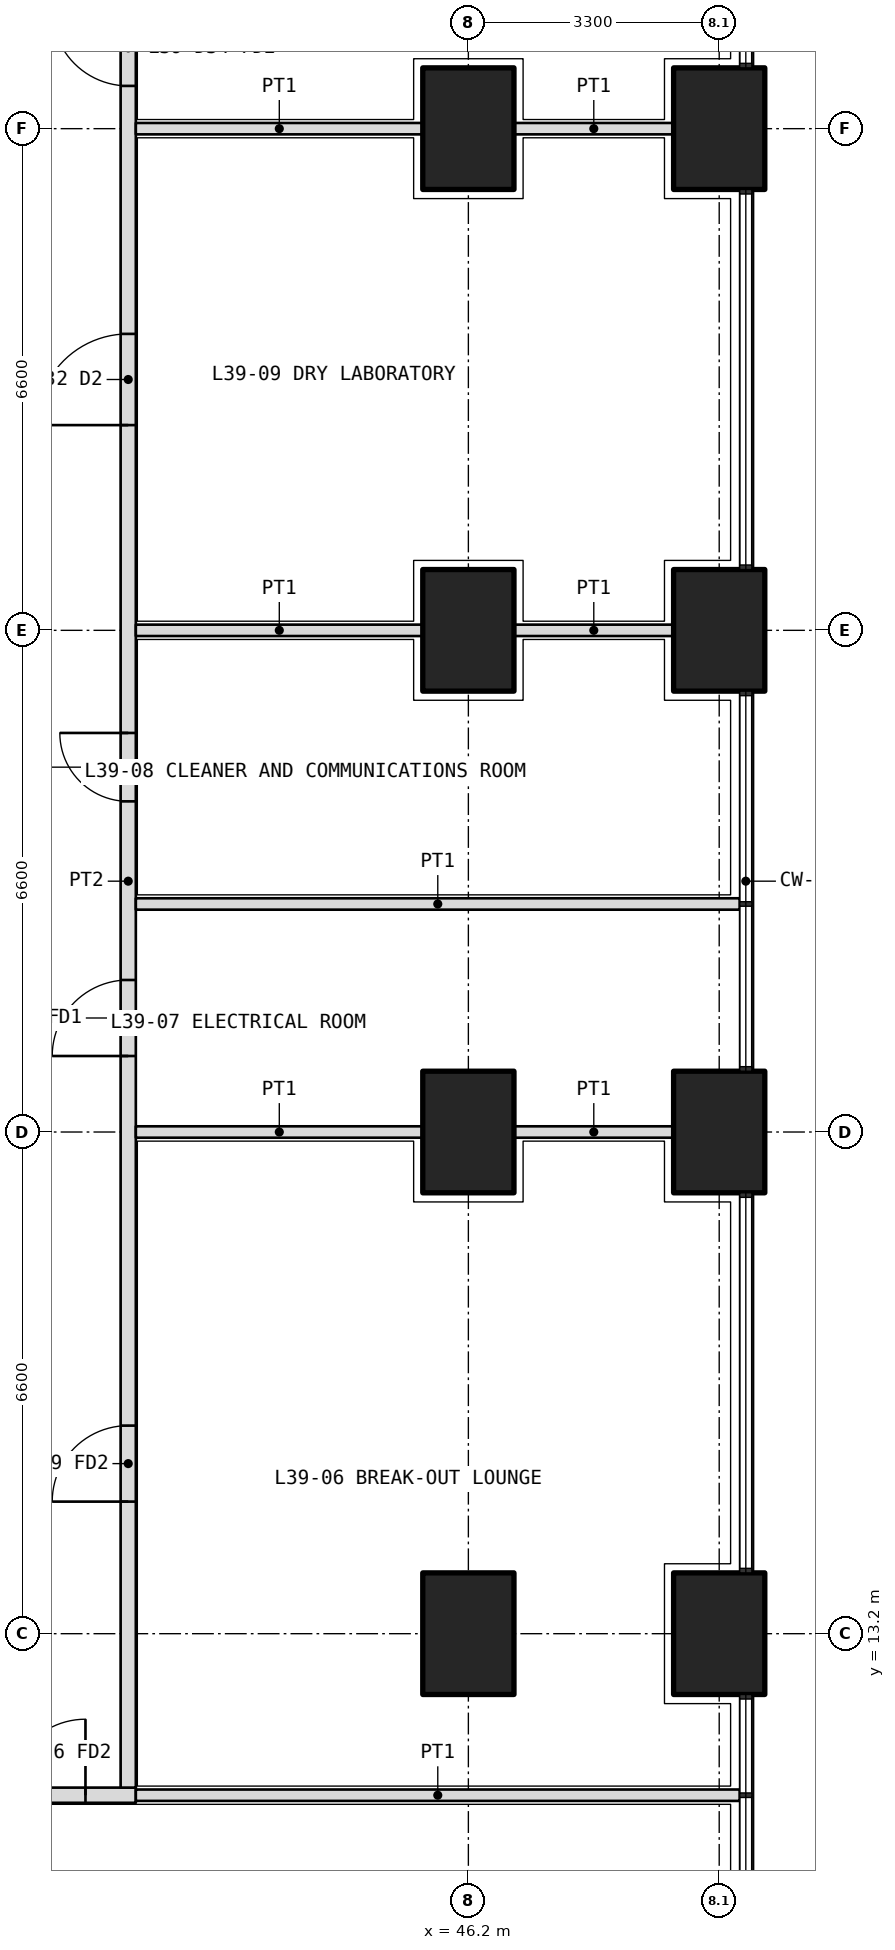
"""IFC4 building model, lengths in metres.
Left out: names, types, materials, properties, quantities, classifications, styles, units other than length and angle.
Written with IfcOpenShell. Run it as: python <this file> out.ifc"""

import sys

from ifc_helpers import new_model, si_unit, direction, frame, frame_2d, origin, origin_2d, place, context, subcontext, project, spatial, rectangle, extrude, element, fill, save


model = new_model("IFC4")
c1 = context("Model", 3, precision=1e-05, world=origin(), true_north=direction((0.0, 1.0)))
c2 = subcontext(c1, "Body", "Model", "MODEL_VIEW")
j1 = project(units=[si_unit("LENGTHUNIT", "METRE"), si_unit("PLANEANGLEUNIT", "RADIAN")], contexts=[c1])
p1 = place(None, origin())
s1 = spatial("IfcSite", under=j1, at=p1, CompositionType="ELEMENT")
p2 = place(p1, origin())
s2 = spatial("IfcBuilding", under=s1, at=p2, CompositionType="ELEMENT")
p3 = place(p2, frame((0.0, 0.0, 172.5)))
s3 = spatial("IfcBuildingStorey", under=s2, at=p3, CompositionType="ELEMENT", Elevation=172.5)
for number, where, z_axis, x_axis in (
    (1, (49.5, 13.2, 0.0), (0.0, 0.0, 1.0), (0.0, 1.0, 0.0)),
    (2, (49.5, 19.8, 0.0), (0.0, 0.0, 1.0), (0.0, 1.0, 0.0)),
    (3, (49.5, 26.4, 0.0), (0.0, 0.0, 1.0), (0.0, 1.0, 0.0)),
    (4, (49.5, 33.0, 0.0), (0.0, 0.0, 1.0), (0.0, 1.0, 0.0)),
    (5, (46.2, 13.2, 0.0), (0.0, 0.0, 1.0), (0.0, 1.0, 0.0)),
    (6, (46.2, 19.8, 0.0), (0.0, 0.0, 1.0), (0.0, 1.0, 0.0)),
    (7, (46.2, 26.4, 0.0), (0.0, 0.0, 1.0), (0.0, 1.0, 0.0)),
    (8, (46.2, 33.0, 0.0), (0.0, 0.0, 1.0), (0.0, 1.0, 0.0)),
):
    element("IfcColumn", number, at=place(p3, frame(where, z_axis=z_axis, x_axis=x_axis)), inside=s3, PredefinedType="COLUMN", context=c2, shape_type="SweptSolid", body=[
        extrude(rectangle(XDim=1.6, YDim=1.2, at=origin_2d()), origin(), (0.0, 0.0, 1.0), 4.2),
    ])
p4 = place(p3, frame((10.975, 11.075, 0.0), z_axis=(0.0, 0.0, 1.0), x_axis=(1.0, 0.0, 0.0)))
e9 = element("IfcWall", 9, at=p4, inside=s3, PredefinedType="PARTITIONING", context=c2, shape_type="SweptSolid", body=[
    extrude(rectangle(XDim=30.85, YDim=0.2, at=frame_2d((15.425, 0.0))), origin(), (0.0, 0.0, 1.0), 2.85),
])
p5 = place(p4, frame((7.262, 0.0, 0.0)))
e10 = element("IfcOpeningElement", 10, at=p5, cuts=e9, PredefinedType="OPENING", context=c2, shape_type="SweptSolid", body=[
    extrude(rectangle(XDim=1.0, YDim=2.1, at=frame_2d((0.5, 1.05))), frame((0.0, 0.11, 0.0), z_axis=(0.0, -1.0, 0.0), x_axis=(1.0, 0.0, 0.0)), (0.0, 0.0, 1.0), 0.22),
])
p6 = place(p4, frame((16.475, 0.0, 0.0)))
e11 = element("IfcOpeningElement", 11, at=p6, cuts=e9, PredefinedType="OPENING", context=c2, shape_type="SweptSolid", body=[
    extrude(rectangle(XDim=1.2, YDim=2.1, at=frame_2d((0.6, 1.05))), frame((0.0, 0.11, 0.0), z_axis=(0.0, -1.0, 0.0), x_axis=(1.0, 0.0, 0.0)), (0.0, 0.0, 1.0), 0.22),
])
p7 = place(p4, frame((21.525, 0.0, 0.0)))
e12 = element("IfcOpeningElement", 12, at=p7, cuts=e9, PredefinedType="OPENING", context=c2, shape_type="SweptSolid", body=[
    extrude(rectangle(XDim=1.0, YDim=2.1, at=frame_2d((0.5, 1.05))), frame((0.0, 0.11, 0.0), z_axis=(0.0, -1.0, 0.0), x_axis=(1.0, 0.0, 0.0)), (0.0, 0.0, 1.0), 0.22),
])
p8 = place(p4, frame((26.375, 0.0, 0.0)))
e13 = element("IfcOpeningElement", 13, at=p8, cuts=e9, PredefinedType="OPENING", context=c2, shape_type="SweptSolid", body=[
    extrude(rectangle(XDim=1.2, YDim=2.1, at=frame_2d((0.6, 1.05))), frame((0.0, 0.11, 0.0), z_axis=(0.0, -1.0, 0.0), x_axis=(1.0, 0.0, 0.0)), (0.0, 0.0, 1.0), 0.22),
])
p9 = place(p4, frame((29.188, 0.0, 0.0)))
e14 = element("IfcOpeningElement", 14, at=p9, cuts=e9, PredefinedType="OPENING", context=c2, shape_type="SweptSolid", body=[
    extrude(rectangle(XDim=1.0, YDim=2.1, at=frame_2d((0.5, 1.05))), frame((0.0, 0.11, 0.0), z_axis=(0.0, -1.0, 0.0), x_axis=(1.0, 0.0, 0.0)), (0.0, 0.0, 1.0), 0.22),
])
p10 = place(p3, frame((41.725, 11.175, 0.0), z_axis=(0.0, 0.0, 1.0), x_axis=(0.0, 1.0, 0.0)))
e15 = element("IfcWall", 15, at=p10, inside=s3, PredefinedType="PARTITIONING", context=c2, shape_type="SweptSolid", body=[
    extrude(rectangle(XDim=23.85, YDim=0.2, at=frame_2d((11.925, 0.0))), origin(), (0.0, 0.0, 1.0), 2.85),
])
p11 = place(p10, frame((3.762, 0.0, 0.0)))
e16 = element("IfcOpeningElement", 16, at=p11, cuts=e15, PredefinedType="OPENING", context=c2, shape_type="SweptSolid", body=[
    extrude(rectangle(XDim=1.0, YDim=2.1, at=frame_2d((0.5, 1.05))), frame((0.0, 0.11, 0.0), z_axis=(0.0, -1.0, 0.0), x_axis=(1.0, 0.0, 0.0)), (0.0, 0.0, 1.0), 0.22),
])
p12 = place(p10, frame((9.625, 0.0, 0.0)))
e17 = element("IfcOpeningElement", 17, at=p12, cuts=e15, PredefinedType="OPENING", context=c2, shape_type="SweptSolid", body=[
    extrude(rectangle(XDim=1.0, YDim=2.1, at=frame_2d((0.5, 1.05))), frame((0.0, 0.11, 0.0), z_axis=(0.0, -1.0, 0.0), x_axis=(1.0, 0.0, 0.0)), (0.0, 0.0, 1.0), 0.22),
])
p13 = place(p10, frame((12.975, 0.0, 0.0)))
e18 = element("IfcOpeningElement", 18, at=p13, cuts=e15, PredefinedType="OPENING", context=c2, shape_type="SweptSolid", body=[
    extrude(rectangle(XDim=0.9, YDim=2.1, at=frame_2d((0.45, 1.05))), frame((0.0, 0.11, 0.0), z_axis=(0.0, -1.0, 0.0), x_axis=(1.0, 0.0, 0.0)), (0.0, 0.0, 1.0), 0.22),
])
p14 = place(p10, frame((17.925, 0.0, 0.0)))
e19 = element("IfcOpeningElement", 19, at=p14, cuts=e15, PredefinedType="OPENING", context=c2, shape_type="SweptSolid", body=[
    extrude(rectangle(XDim=1.2, YDim=2.1, at=frame_2d((0.6, 1.05))), frame((0.0, 0.11, 0.0), z_axis=(0.0, -1.0, 0.0), x_axis=(1.0, 0.0, 0.0)), (0.0, 0.0, 1.0), 0.22),
])
p15 = place(p10, frame((22.387, 0.0, 0.0)))
e20 = element("IfcOpeningElement", 20, at=p15, cuts=e15, PredefinedType="OPENING", context=c2, shape_type="SweptSolid", body=[
    extrude(rectangle(XDim=1.0, YDim=2.1, at=frame_2d((0.5, 1.05))), frame((0.0, 0.11, 0.0), z_axis=(0.0, -1.0, 0.0), x_axis=(1.0, 0.0, 0.0)), (0.0, 0.0, 1.0), 0.22),
])
for number, where, z_axis, x_axis in (
    (21, (49.77, 11.075, 0.0), (0.0, 0.0, 1.0), (-1.0, 0.0, 0.0)),
    (22, (49.77, 22.8, 0.0), (0.0, 0.0, 1.0), (-1.0, 0.0, 0.0)),
):
    element("IfcWall", number, at=place(p3, frame(where, z_axis=z_axis, x_axis=x_axis)), inside=s3, PredefinedType="PARTITIONING", context=c2, shape_type="SweptSolid", body=[
        extrude(rectangle(XDim=7.945, YDim=0.15, at=frame_2d((3.973, 0.0))), origin(), (0.0, 0.0, 1.0), 2.7),
    ])
p16 = place(p3, frame((48.9, 26.4, 0.0), z_axis=(0.0, 0.0, 1.0), x_axis=(-1.0, 0.0, 0.0)))
e23 = element("IfcWall", 23, at=p16, inside=s3, PredefinedType="PARTITIONING", context=c2, shape_type="SweptSolid", body=[
    extrude(rectangle(XDim=2.1, YDim=0.15, at=frame_2d((1.05, 0.0))), origin(), (0.0, 0.0, 1.0), 2.85),
])
p17 = place(p3, frame((45.6, 26.4, 0.0), z_axis=(0.0, 0.0, 1.0), x_axis=(-1.0, 0.0, 0.0)))
e24 = element("IfcWall", 24, at=p17, inside=s3, PredefinedType="PARTITIONING", context=c2, shape_type="SweptSolid", body=[
    extrude(rectangle(XDim=3.775, YDim=0.15, at=frame_2d((1.888, 0.0))), origin(), (0.0, 0.0, 1.0), 2.85),
])
p18 = place(p3, frame((48.9, 19.8, 0.0), z_axis=(0.0, 0.0, 1.0), x_axis=(-1.0, 0.0, 0.0)))
e25 = element("IfcWall", 25, at=p18, inside=s3, PredefinedType="PARTITIONING", context=c2, shape_type="SweptSolid", body=[
    extrude(rectangle(XDim=2.1, YDim=0.15, at=frame_2d((1.05, 0.0))), origin(), (0.0, 0.0, 1.0), 2.85),
])
p19 = place(p3, frame((45.6, 19.8, 0.0), z_axis=(0.0, 0.0, 1.0), x_axis=(-1.0, 0.0, 0.0)))
e26 = element("IfcWall", 26, at=p19, inside=s3, PredefinedType="PARTITIONING", context=c2, shape_type="SweptSolid", body=[
    extrude(rectangle(XDim=3.775, YDim=0.15, at=frame_2d((1.888, 0.0))), origin(), (0.0, 0.0, 1.0), 2.85),
])
p20 = place(p3, frame((48.9, 33.0, 0.0), z_axis=(0.0, 0.0, 1.0), x_axis=(-1.0, 0.0, 0.0)))
e27 = element("IfcWall", 27, at=p20, inside=s3, PredefinedType="PARTITIONING", context=c2, shape_type="SweptSolid", body=[
    extrude(rectangle(XDim=2.1, YDim=0.15, at=frame_2d((1.05, 0.0))), origin(), (0.0, 0.0, 1.0), 2.85),
])
p21 = place(p3, frame((45.6, 33.0, 0.0), z_axis=(0.0, 0.0, 1.0), x_axis=(-1.0, 0.0, 0.0)))
e28 = element("IfcWall", 28, at=p21, inside=s3, PredefinedType="PARTITIONING", context=c2, shape_type="SweptSolid", body=[
    extrude(rectangle(XDim=3.775, YDim=0.15, at=frame_2d((1.888, 0.0))), origin(), (0.0, 0.0, 1.0), 2.85),
])
p22 = place(p9, origin())
e29 = element("IfcDoor", 29, at=p22, inside=s3, OperationType="SINGLE_SWING_RIGHT", PredefinedType="DOOR", context=c2, shape_type="SweptSolid", body=[
    extrude(rectangle(XDim=1.0, YDim=2.1, at=frame_2d((0.5, 1.05))), frame((0.0, 0.025, 0.0), z_axis=(0.0, -1.0, 0.0), x_axis=(1.0, 0.0, 0.0)), (0.0, 0.0, 1.0), 0.05),
])
fill(e14, e29)
p23 = place(p11, origin())
e30 = element("IfcDoor", 30, at=p23, inside=s3, OperationType="SINGLE_SWING_LEFT", PredefinedType="DOOR", context=c2, shape_type="SweptSolid", body=[
    extrude(rectangle(XDim=1.0, YDim=2.1, at=frame_2d((0.5, 1.05))), frame((0.0, 0.025, 0.0), z_axis=(0.0, -1.0, 0.0), x_axis=(1.0, 0.0, 0.0)), (0.0, 0.0, 1.0), 0.05),
])
fill(e16, e30)
p24 = place(p12, origin())
e31 = element("IfcDoor", 31, at=p24, inside=s3, OperationType="SINGLE_SWING_LEFT", PredefinedType="DOOR", context=c2, shape_type="SweptSolid", body=[
    extrude(rectangle(XDim=1.0, YDim=2.1, at=frame_2d((0.5, 1.05))), frame((0.0, 0.025, 0.0), z_axis=(0.0, -1.0, 0.0), x_axis=(1.0, 0.0, 0.0)), (0.0, 0.0, 1.0), 0.05),
])
fill(e17, e31)
p25 = place(p13, origin())
e32 = element("IfcDoor", 32, at=p25, inside=s3, OperationType="SINGLE_SWING_RIGHT", PredefinedType="DOOR", context=c2, shape_type="SweptSolid", body=[
    extrude(rectangle(XDim=0.9, YDim=2.1, at=frame_2d((0.45, 1.05))), frame((0.0, 0.025, 0.0), z_axis=(0.0, -1.0, 0.0), x_axis=(1.0, 0.0, 0.0)), (0.0, 0.0, 1.0), 0.05),
])
fill(e18, e32)
p26 = place(p14, origin())
e33 = element("IfcDoor", 33, at=p26, inside=s3, OperationType="DOUBLE_DOOR_SINGLE_SWING", PredefinedType="DOOR", context=c2, shape_type="SweptSolid", body=[
    extrude(rectangle(XDim=1.2, YDim=2.1, at=frame_2d((0.6, 1.05))), frame((0.0, 0.025, 0.0), z_axis=(0.0, -1.0, 0.0), x_axis=(1.0, 0.0, 0.0)), (0.0, 0.0, 1.0), 0.05),
])
fill(e19, e33)
p27 = place(p15, origin())
e34 = element("IfcDoor", 34, at=p27, inside=s3, OperationType="SINGLE_SWING_RIGHT", PredefinedType="DOOR", context=c2, shape_type="SweptSolid", body=[
    extrude(rectangle(XDim=1.0, YDim=2.1, at=frame_2d((0.5, 1.05))), frame((0.0, 0.025, 0.0), z_axis=(0.0, -1.0, 0.0), x_axis=(1.0, 0.0, 0.0)), (0.0, 0.0, 1.0), 0.05),
])
fill(e20, e34)
save(model, sys.argv[1])
